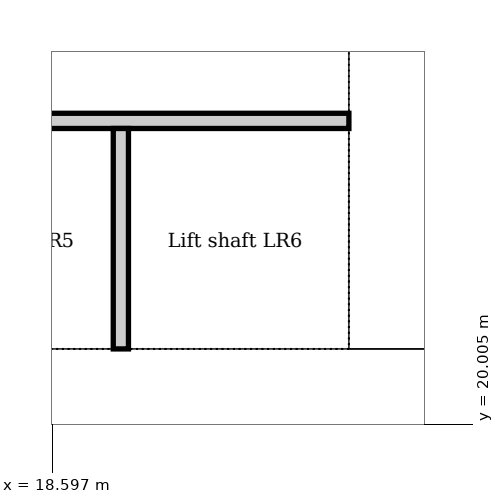
"""IFC4 building model, lengths in metres.
Left out: names, types, materials, properties, quantities, classifications, styles, units other than length and angle.
Written with IfcOpenShell. Run it as: python <this file> out.ifc"""

import sys

from ifc_helpers import new_model, si_unit, direction, frame, frame_2d, origin, place, context, subcontext, project, spatial, rectangle, extrude, element, save


model = new_model("IFC4")
c1 = context("Model", 3, precision=1e-05, world=origin(), true_north=direction((0.0, 1.0)))
c2 = subcontext(c1, "Body", "Model", "MODEL_VIEW")
j1 = project(units=[si_unit("LENGTHUNIT", "METRE"), si_unit("PLANEANGLEUNIT", "RADIAN")], contexts=[c1])
p1 = place(None, origin())
s1 = spatial("IfcSite", under=j1, at=p1, CompositionType="ELEMENT")
p2 = place(p1, origin())
s2 = spatial("IfcBuilding", under=s1, at=p2, CompositionType="ELEMENT")
p3 = place(p2, frame((0.0, 0.0, -5.0)))
s3 = spatial("IfcBuildingStorey", under=s2, at=p3, CompositionType="ELEMENT", Elevation=-5.0)
p4 = place(p3, frame((3.9, 20.4, 0.0), z_axis=(0.0, 0.0, 1.0), x_axis=(1.0, 0.0, 0.0)))
e1 = element("IfcWall", 1, at=p4, inside=s3, PredefinedType="SOLIDWALL", context=c2, shape_type="SweptSolid", body=[
    extrude(rectangle(XDim=19.8, YDim=1.2, at=frame_2d((9.9, 0.0))), origin(), (0.0, 0.0, 1.0), 5.0),
])
p5 = place(p3, frame((23.1, 21.0, 0.0), z_axis=(0.0, 0.0, 1.0), x_axis=(0.0, 1.0, 0.0)))
e2 = element("IfcWall", 2, at=p5, inside=s3, PredefinedType="SOLIDWALL", context=c2, shape_type="SweptSolid", body=[
    extrude(rectangle(XDim=10.5, YDim=1.2, at=frame_2d((5.25, 0.0))), origin(), (0.0, 0.0, 1.0), 5.0),
])
p6 = place(p5, frame((4.35, 0.0, 0.0)))
e3 = element("IfcOpeningElement", 3, at=p6, cuts=e2, PredefinedType="OPENING", context=c2, shape_type="SweptSolid", body=[
    extrude(rectangle(XDim=1.8, YDim=2.1, at=frame_2d((0.9, 1.05))), frame((0.0, 0.61, 0.0), z_axis=(0.0, -1.0, 0.0), x_axis=(1.0, 0.0, 0.0)), (0.0, 0.0, 1.0), 1.22),
])
p7 = place(p3, frame((4.5, 24.0, 0.0), z_axis=(0.0, 0.0, 1.0), x_axis=(1.0, 0.0, 0.0)))
e4 = element("IfcWall", 4, at=p7, inside=s3, PredefinedType="PARTITIONING", context=c2, shape_type="SweptSolid", body=[
    extrude(rectangle(XDim=18.0, YDim=0.2, at=frame_2d((9.0, 0.0))), origin(), (0.0, 0.0, 1.0), 4.7),
])
p8 = place(p3, frame((19.5, 21.0, 0.0), z_axis=(0.0, 0.0, 1.0), x_axis=(0.0, 1.0, 0.0)))
e5 = element("IfcWall", 5, at=p8, inside=s3, PredefinedType="PARTITIONING", context=c2, shape_type="SweptSolid", body=[
    extrude(rectangle(XDim=2.9, YDim=0.2, at=frame_2d((1.45, 0.0))), origin(), (0.0, 0.0, 1.0), 4.7),
])
save(model, sys.argv[1])
